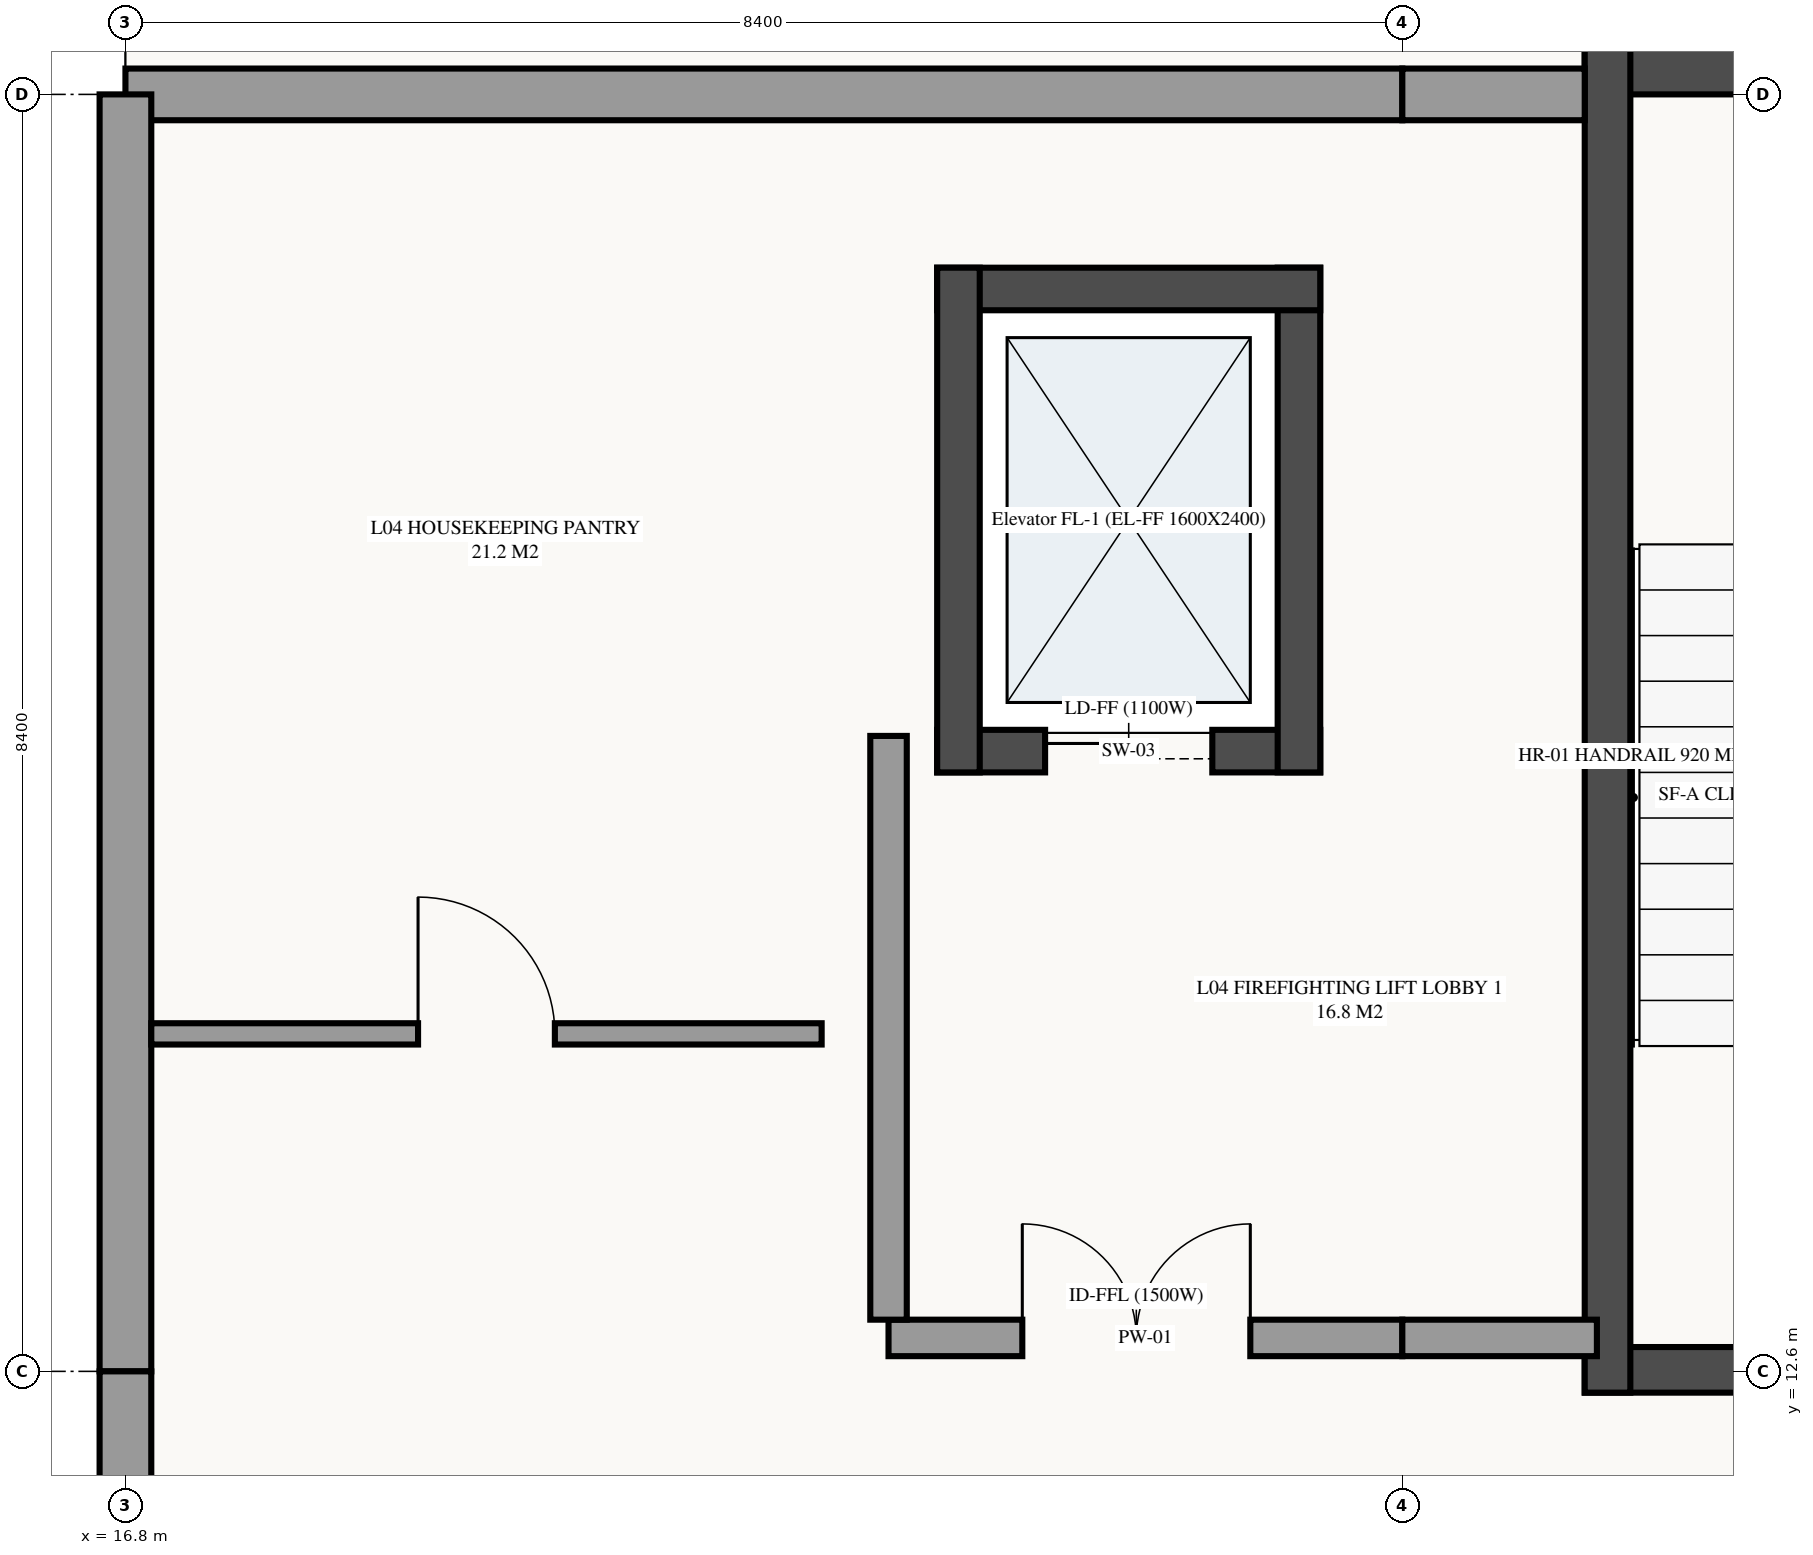
"""IFC4 building model, lengths in metres.
Left out: names, types, materials, properties, quantities, classifications, styles, units other than length and angle.
Written with IfcOpenShell. Run it as: python <this file> out.ifc"""

import sys

from ifc_helpers import new_model, si_unit, direction, frame, frame_2d, origin, origin_2d, place, context, subcontext, project, spatial, rectangle, extrude, element, fill, save


model = new_model("IFC4")
c1 = context("Model", 3, precision=1e-05, world=origin(), true_north=direction((0.0, 1.0)))
c2 = subcontext(c1, "Body", "Model", "MODEL_VIEW")
j1 = project(units=[si_unit("LENGTHUNIT", "METRE"), si_unit("PLANEANGLEUNIT", "RADIAN")], contexts=[c1])
p1 = place(None, origin())
s1 = spatial("IfcSite", under=j1, at=p1, CompositionType="ELEMENT")
p2 = place(p1, origin())
s2 = spatial("IfcBuilding", under=s1, at=p2, CompositionType="ELEMENT")
p3 = place(p2, frame((0.0, 0.0, 18.3)))
s3 = spatial("IfcBuildingStorey", under=s2, at=p3, CompositionType="ELEMENT", Elevation=18.3)
p4 = place(p3, frame((16.8, 12.6, 0.0), z_axis=(0.0, 0.0, 1.0), x_axis=(1.0, 0.0, 0.0)))
e1 = element("IfcColumn", 1, at=p4, inside=s3, PredefinedType="COLUMN", context=c2, shape_type="SweptSolid", body=[
    extrude(rectangle(XDim=0.65, YDim=0.65, at=origin_2d()), origin(), (0.0, 0.0, 1.0), 3.6),
])
p5 = place(p3, frame((16.8, 21.0, 0.0), z_axis=(0.0, 0.0, 1.0), x_axis=(1.0, 0.0, 0.0)))
e2 = element("IfcColumn", 2, at=p5, inside=s3, PredefinedType="COLUMN", context=c2, shape_type="SweptSolid", body=[
    extrude(rectangle(XDim=0.6, YDim=0.8, at=origin_2d()), origin(), (0.0, 0.0, 1.0), 3.6),
])
p6 = place(p3, frame((25.2, 12.6, 0.0), z_axis=(0.0, 0.0, 1.0), x_axis=(1.0, 0.0, 0.0)))
e3 = element("IfcColumn", 3, at=p6, inside=s3, PredefinedType="COLUMN", context=c2, shape_type="SweptSolid", body=[
    extrude(rectangle(XDim=0.65, YDim=0.65, at=origin_2d()), origin(), (0.0, 0.0, 1.0), 3.6),
])
p7 = place(p3, frame((25.2, 21.0, 0.0), z_axis=(0.0, 0.0, 1.0), x_axis=(1.0, 0.0, 0.0)))
e4 = element("IfcColumn", 4, at=p7, inside=s3, PredefinedType="COLUMN", context=c2, shape_type="SweptSolid", body=[
    extrude(rectangle(XDim=0.6, YDim=0.8, at=origin_2d()), origin(), (0.0, 0.0, 1.0), 3.6),
])
p8 = place(p3, frame((25.2, 21.0, 0.0), z_axis=(0.0, 0.0, 1.0), x_axis=(-1.0, 0.0, 0.0)))
e5 = element("IfcWall", 5, at=p8, inside=s3, PredefinedType="STANDARD", context=c2, shape_type="SweptSolid", body=[
    extrude(rectangle(XDim=8.4, YDim=0.34, at=frame_2d((4.2, 0.0))), origin(), (0.0, 0.0, 1.0), 2.88),
])
p9 = place(p3, frame((16.8, 21.0, 0.0), z_axis=(0.0, 0.0, 1.0), x_axis=(0.0, -1.0, 0.0)))
e6 = element("IfcWall", 6, at=p9, inside=s3, PredefinedType="STANDARD", context=c2, shape_type="SweptSolid", body=[
    extrude(rectangle(XDim=8.4, YDim=0.34, at=frame_2d((4.2, 0.0))), origin(), (0.0, 0.0, 1.0), 2.58),
])
p10 = place(p3, frame((22.14, 16.68, 0.0), z_axis=(0.0, 0.0, 1.0), x_axis=(1.0, 0.0, 0.0)))
e7 = element("IfcWall", 7, at=p10, inside=s3, PredefinedType="SHEAR", context=c2, shape_type="SweptSolid", body=[
    extrude(rectangle(XDim=2.52, YDim=0.28, at=frame_2d((1.26, 0.0))), origin(), (0.0, 0.0, 1.0), 3.6),
])
p11 = place(p10, frame((0.71, 0.0, 0.0)))
e8 = element("IfcOpeningElement", 8, at=p11, cuts=e7, PredefinedType="OPENING", context=c2, shape_type="SweptSolid", body=[
    extrude(rectangle(XDim=1.1, YDim=2.2, at=frame_2d((0.55, 1.1))), frame((0.0, 0.15, 0.0), z_axis=(0.0, -1.0, 0.0), x_axis=(1.0, 0.0, 0.0)), (0.0, 0.0, 1.0), 0.3),
])
p12 = place(p3, frame((24.52, 16.54, 0.0), z_axis=(0.0, 0.0, 1.0), x_axis=(0.0, 1.0, 0.0)))
e9 = element("IfcWall", 9, at=p12, inside=s3, PredefinedType="SHEAR", context=c2, shape_type="SweptSolid", body=[
    extrude(rectangle(XDim=3.32, YDim=0.28, at=frame_2d((1.66, 0.0))), origin(), (0.0, 0.0, 1.0), 3.6),
])
p13 = place(p3, frame((24.66, 19.72, 0.0), z_axis=(0.0, 0.0, 1.0), x_axis=(-1.0, 0.0, 0.0)))
e10 = element("IfcWall", 10, at=p13, inside=s3, PredefinedType="SHEAR", context=c2, shape_type="SweptSolid", body=[
    extrude(rectangle(XDim=2.52, YDim=0.28, at=frame_2d((1.26, 0.0))), origin(), (0.0, 0.0, 1.0), 3.6),
])
p14 = place(p3, frame((22.28, 19.86, 0.0), z_axis=(0.0, 0.0, 1.0), x_axis=(0.0, -1.0, 0.0)))
e11 = element("IfcWall", 11, at=p14, inside=s3, PredefinedType="SHEAR", context=c2, shape_type="SweptSolid", body=[
    extrude(rectangle(XDim=3.32, YDim=0.28, at=frame_2d((1.66, 0.0))), origin(), (0.0, 0.0, 1.0), 3.6),
])
p15 = place(p3, frame((26.4, 12.61, 0.0), z_axis=(0.0, 0.0, 1.0), x_axis=(1.0, 0.0, 0.0)))
e12 = element("IfcWall", 12, at=p15, inside=s3, PredefinedType="SHEAR", context=c2, shape_type="SweptSolid", body=[
    extrude(rectangle(XDim=5.2, YDim=0.3, at=frame_2d((2.6, 0.0))), origin(), (0.0, 0.0, 1.0), 3.6),
])
p16 = place(p15, frame((2.025, 0.0, 0.0)))
e13 = element("IfcOpeningElement", 13, at=p16, cuts=e12, PredefinedType="OPENING", context=c2, shape_type="SweptSolid", body=[
    extrude(rectangle(XDim=1.15, YDim=2.15, at=frame_2d((0.575, 1.075))), frame((0.0, 0.16, 0.0), z_axis=(0.0, -1.0, 0.0), x_axis=(1.0, 0.0, 0.0)), (0.0, 0.0, 1.0), 0.32),
])
p17 = place(p3, frame((31.6, 21.15, 0.0), z_axis=(0.0, 0.0, 1.0), x_axis=(-1.0, 0.0, 0.0)))
e14 = element("IfcWall", 14, at=p17, inside=s3, PredefinedType="SHEAR", context=c2, shape_type="SweptSolid", body=[
    extrude(rectangle(XDim=5.2, YDim=0.3, at=frame_2d((2.6, 0.0))), origin(), (0.0, 0.0, 1.0), 3.6),
])
p18 = place(p3, frame((26.55, 21.3, 0.0), z_axis=(0.0, 0.0, 1.0), x_axis=(0.0, -1.0, 0.0)))
e15 = element("IfcWall", 15, at=p18, inside=s3, PredefinedType="SHEAR", context=c2, shape_type="SweptSolid", body=[
    extrude(rectangle(XDim=8.84, YDim=0.3, at=frame_2d((4.42, 0.0))), origin(), (0.0, 0.0, 1.0), 3.6),
])
p19 = place(p3, frame((21.82, 12.82, 0.0), z_axis=(0.0, 0.0, 1.0), x_axis=(1.0, 0.0, 0.0)))
e16 = element("IfcWall", 16, at=p19, inside=s3, PredefinedType="PARTITIONING", context=c2, shape_type="SweptSolid", body=[
    extrude(rectangle(XDim=3.38, YDim=0.24, at=frame_2d((1.69, 0.0))), origin(), (0.0, 0.0, 1.0), 2.48),
])
p20 = place(p19, frame((0.88, 0.0, 0.0)))
e17 = element("IfcOpeningElement", 17, at=p20, cuts=e16, PredefinedType="OPENING", context=c2, shape_type="SweptSolid", body=[
    extrude(rectangle(XDim=1.5, YDim=2.15, at=frame_2d((0.75, 1.075))), frame((0.0, 0.13, 0.0), z_axis=(0.0, -1.0, 0.0), x_axis=(1.0, 0.0, 0.0)), (0.0, 0.0, 1.0), 0.26),
])
p21 = place(p3, frame((21.82, 12.94, 0.0), z_axis=(0.0, 0.0, 1.0), x_axis=(0.0, 1.0, 0.0)))
e18 = element("IfcWall", 18, at=p21, inside=s3, PredefinedType="PARTITIONING", context=c2, shape_type="SweptSolid", body=[
    extrude(rectangle(XDim=3.84, YDim=0.24, at=frame_2d((1.92, 0.0))), origin(), (0.0, 0.0, 1.0), 3.375),
])
p22 = place(p3, frame((16.97, 14.82, 0.0), z_axis=(0.0, 0.0, 1.0), x_axis=(1.0, 0.0, 0.0)))
e19 = element("IfcWall", 19, at=p22, inside=s3, PredefinedType="PARTITIONING", context=c2, shape_type="SweptSolid", body=[
    extrude(rectangle(XDim=4.41, YDim=0.14, at=frame_2d((2.205, 0.0))), origin(), (0.0, 0.0, 1.0), 3.375),
])
p23 = place(p22, frame((1.755, 0.0, 0.0)))
e20 = element("IfcOpeningElement", 20, at=p23, cuts=e19, PredefinedType="OPENING", context=c2, shape_type="SweptSolid", body=[
    extrude(rectangle(XDim=0.9, YDim=2.12, at=frame_2d((0.45, 1.06))), frame((0.0, 0.08, 0.0), z_axis=(0.0, -1.0, 0.0), x_axis=(1.0, 0.0, 0.0)), (0.0, 0.0, 1.0), 0.16),
])
p24 = place(p3, frame((26.4, 21.0, 0.0), z_axis=(0.0, 0.0, 1.0), x_axis=(-1.0, 0.0, 0.0)))
e21 = element("IfcWall", 21, at=p24, inside=s3, PredefinedType="STANDARD", context=c2, shape_type="SweptSolid", body=[
    extrude(rectangle(XDim=1.2, YDim=0.34, at=frame_2d((0.6, 0.0))), origin(), (0.0, 0.0, 1.0), 2.53),
])
p25 = place(p3, frame((16.8, 12.6, 0.0), z_axis=(0.0, 0.0, 1.0), x_axis=(0.0, -1.0, 0.0)))
e22 = element("IfcWall", 22, at=p25, inside=s3, PredefinedType="STANDARD", context=c2, shape_type="SweptSolid", body=[
    extrude(rectangle(XDim=2.6, YDim=0.34, at=frame_2d((1.3, 0.0))), origin(), (0.0, 0.0, 1.0), 2.48),
])
p26 = place(p3, frame((25.2, 12.82, 0.0), z_axis=(0.0, 0.0, 1.0), x_axis=(1.0, 0.0, 0.0)))
e23 = element("IfcWall", 23, at=p26, inside=s3, PredefinedType="PARTITIONING", context=c2, shape_type="SweptSolid", body=[
    extrude(rectangle(XDim=1.28, YDim=0.24, at=frame_2d((0.64, 0.0))), origin(), (0.0, 0.0, 1.0), 2.58),
])
p27 = place(p11, origin())
e24 = element("IfcDoor", 24, at=p27, inside=s3, OperationType="SLIDING_TO_LEFT", PredefinedType="DOOR", context=c2, shape_type="SweptSolid", body=[
    extrude(rectangle(XDim=1.1, YDim=2.2, at=frame_2d((0.55, 1.1))), frame((0.0, 0.025, 0.0), z_axis=(0.0, -1.0, 0.0), x_axis=(1.0, 0.0, 0.0)), (0.0, 0.0, 1.0), 0.05),
])
fill(e8, e24)
p28 = place(p20, origin())
e25 = element("IfcDoor", 25, at=p28, inside=s3, OperationType="DOUBLE_DOOR_SINGLE_SWING", PredefinedType="DOOR", context=c2, shape_type="SweptSolid", body=[
    extrude(rectangle(XDim=1.5, YDim=2.15, at=frame_2d((0.75, 1.075))), frame((0.0, 0.025, 0.0), z_axis=(0.0, -1.0, 0.0), x_axis=(1.0, 0.0, 0.0)), (0.0, 0.0, 1.0), 0.05),
])
fill(e17, e25)
p29 = place(p23, origin())
e26 = element("IfcDoor", 26, at=p29, inside=s3, OperationType="SINGLE_SWING_LEFT", PredefinedType="DOOR", context=c2, shape_type="SweptSolid", body=[
    extrude(rectangle(XDim=0.9, YDim=2.12, at=frame_2d((0.45, 1.06))), frame((0.0, 0.025, 0.0), z_axis=(0.0, -1.0, 0.0), x_axis=(1.0, 0.0, 0.0)), (0.0, 0.0, 1.0), 0.05),
])
fill(e20, e26)
save(model, sys.argv[1])
